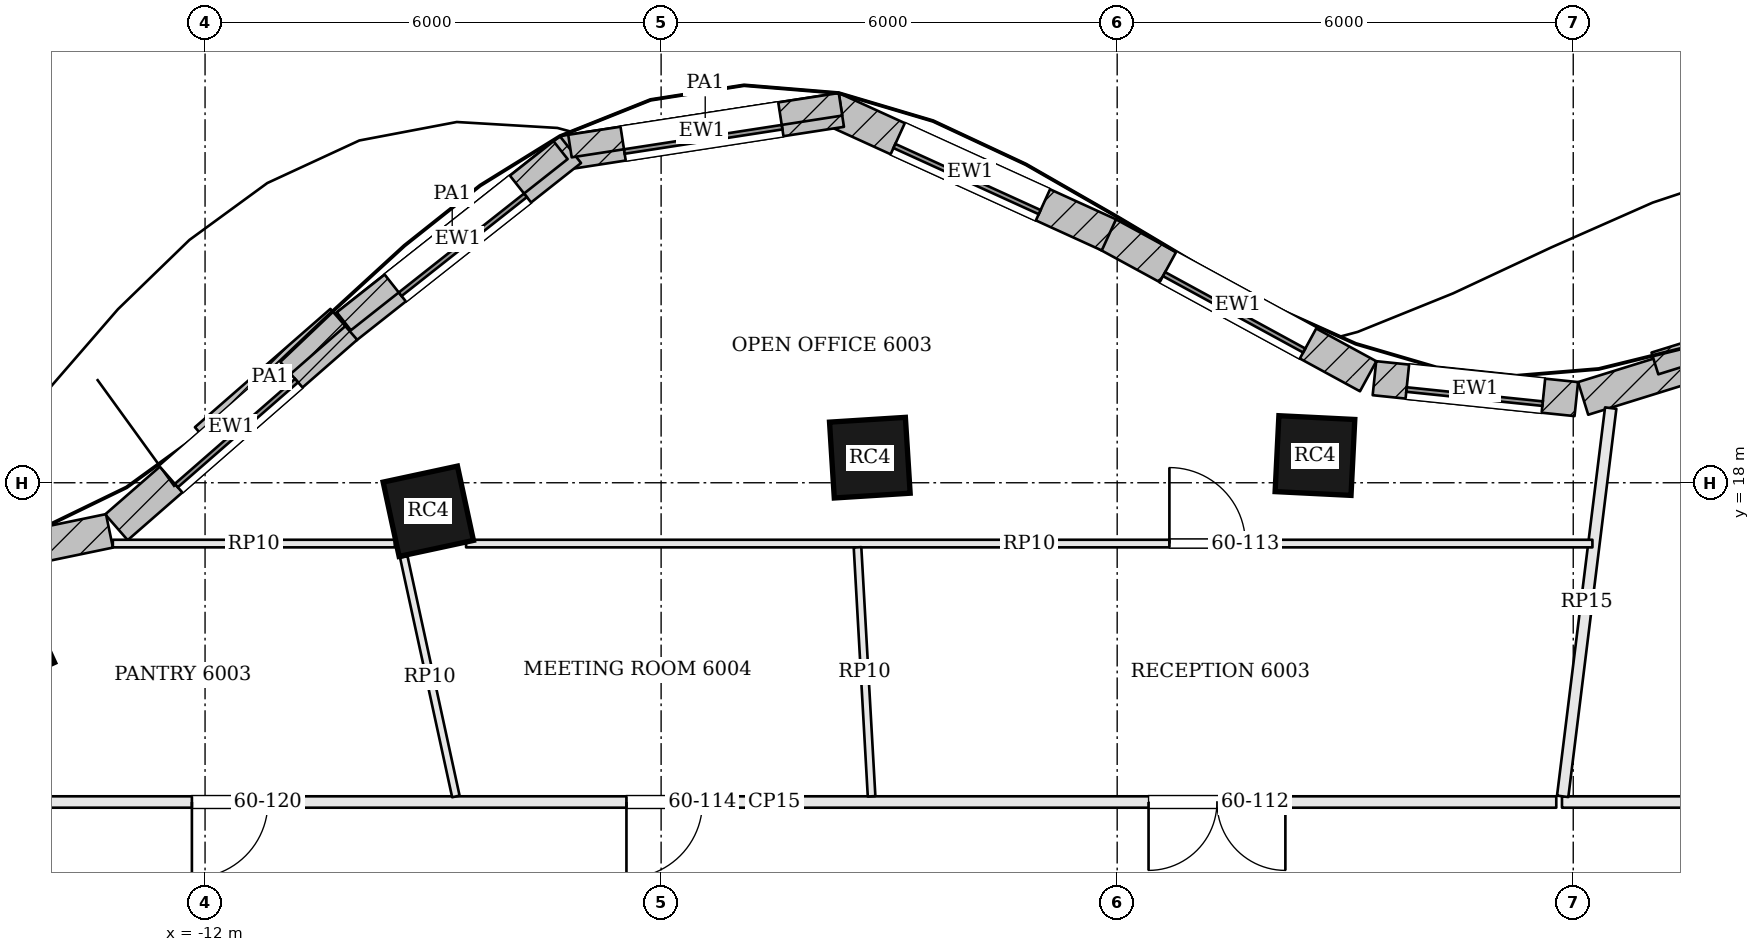
"""IFC4 building model, lengths in metres.
Left out: names, types, materials, properties, quantities, classifications, styles, units other than length and angle.
Written with IfcOpenShell. Run it as: python <this file> out.ifc"""

import sys

from ifc_helpers import new_model, si_unit, direction, frame, frame_2d, origin, origin_2d, place, context, subcontext, project, spatial, rectangle, extrude, element, fill, save


model = new_model("IFC4")
c1 = context("Model", 3, precision=1e-05, world=origin(), true_north=direction((0.0, 1.0)))
c2 = subcontext(c1, "Body", "Model", "MODEL_VIEW")
j1 = project(units=[si_unit("LENGTHUNIT", "METRE"), si_unit("PLANEANGLEUNIT", "RADIAN")], contexts=[c1])
p1 = place(None, origin())
s1 = spatial("IfcSite", under=j1, at=p1, CompositionType="ELEMENT")
p2 = place(p1, origin())
s2 = spatial("IfcBuilding", under=s1, at=p2, CompositionType="ELEMENT")
p3 = place(p2, frame((0.0, 0.0, 244.8)))
s3 = spatial("IfcBuildingStorey", under=s2, at=p3, CompositionType="ELEMENT", Elevation=244.8)
for number, where, z_axis, x_axis in (
    (1, (2.602, 18.358, 0.0), (0.0, 0.0, 1.0), (-0.999, 0.05, 0.0)),
    (2, (-3.254, 18.33, 0.0), (0.0, 0.0, 1.0), (-0.998, -0.063, 0.0)),
    (3, (-9.063, 17.625, 0.0), (0.0, 0.0, 1.0), (-0.978, -0.21, 0.0)),
    (4, (-14.643, 15.881, 0.0), (0.0, 0.0, 1.0), (-0.909, -0.417, 0.0)),
):
    element("IfcColumn", number, at=place(p3, frame(where, z_axis=z_axis, x_axis=x_axis)), inside=s3, PredefinedType="COLUMN", context=c2, shape_type="SweptSolid", body=[
        extrude(rectangle(XDim=1.0, YDim=1.0, at=origin_2d()), origin(), (0.0, 0.0, 1.0), 3.9),
    ])
p4 = place(p3, frame((11.007, 20.625, 0.0), z_axis=(0.0, 0.0, 1.0), x_axis=(-0.954949254112, -0.296769139352, 0.0)))
e5 = element("IfcWall", 5, at=p4, inside=s3, PredefinedType="SOLIDWALL", context=c2, shape_type="SweptSolid", body=[
    extrude(rectangle(XDim=5.106, YDim=0.45, at=frame_2d((2.553, 0.0))), origin(), (0.0, 0.0, 1.0), 3.7),
])
p5 = place(p4, frame((1.503, 0.0, 0.9)))
e6 = element("IfcOpeningElement", 6, at=p5, cuts=e5, PredefinedType="OPENING", context=c2, shape_type="SweptSolid", body=[
    extrude(rectangle(XDim=2.1, YDim=2.3, at=frame_2d((1.05, 1.15))), frame((0.0, 0.235, 0.0), z_axis=(0.0, -1.0, 0.0), x_axis=(1.0, 0.0, 0.0)), (0.0, 0.0, 1.0), 0.47),
])
p6 = place(p3, frame((6.04, 19.101, 0.0), z_axis=(0.0, 0.0, 1.0), x_axis=(-0.994675968472, 0.103052014752, 0.0)))
e7 = element("IfcWall", 7, at=p6, inside=s3, PredefinedType="SOLIDWALL", context=c2, shape_type="SweptSolid", body=[
    extrude(rectangle(XDim=2.67, YDim=0.45, at=frame_2d((1.335, 0.0))), origin(), (0.0, 0.0, 1.0), 3.7),
])
p7 = place(p6, frame((0.435, 0.0, 0.9)))
e8 = element("IfcOpeningElement", 8, at=p7, cuts=e7, PredefinedType="OPENING", context=c2, shape_type="SweptSolid", body=[
    extrude(rectangle(XDim=1.8, YDim=2.3, at=frame_2d((0.9, 1.15))), frame((0.0, 0.235, 0.0), z_axis=(0.0, -1.0, 0.0), x_axis=(1.0, 0.0, 0.0)), (0.0, 0.0, 1.0), 0.47),
])
p8 = place(p3, frame((3.302, 19.401, 0.0), z_axis=(0.0, 0.0, 1.0), x_axis=(-0.878060540763, 0.47854956562, 0.0)))
e9 = element("IfcWall", 9, at=p8, inside=s3, PredefinedType="SOLIDWALL", context=c2, shape_type="SweptSolid", body=[
    extrude(rectangle(XDim=3.901, YDim=0.45, at=frame_2d((1.951, 0.0))), origin(), (0.0, 0.0, 1.0), 3.7),
])
p9 = place(p8, frame((0.901, 0.0, 0.9)))
e10 = element("IfcOpeningElement", 10, at=p9, cuts=e9, PredefinedType="OPENING", context=c2, shape_type="SweptSolid", body=[
    extrude(rectangle(XDim=2.1, YDim=2.3, at=frame_2d((1.05, 1.15))), frame((0.0, 0.235, 0.0), z_axis=(0.0, -1.0, 0.0), x_axis=(1.0, 0.0, 0.0)), (0.0, 0.0, 1.0), 0.47),
])
p10 = place(p3, frame((-0.109, 21.261, 0.0), z_axis=(0.0, 0.0, 1.0), x_axis=(-0.910040573706, 0.414519184367, 0.0)))
e11 = element("IfcWall", 11, at=p10, inside=s3, PredefinedType="SOLIDWALL", context=c2, shape_type="SweptSolid", body=[
    extrude(rectangle(XDim=4.006, YDim=0.45, at=frame_2d((2.003, 0.0))), origin(), (0.0, 0.0, 1.0), 3.7),
])
p11 = place(p10, frame((0.953, 0.0, 0.9)))
e12 = element("IfcOpeningElement", 12, at=p11, cuts=e11, PredefinedType="OPENING", context=c2, shape_type="SweptSolid", body=[
    extrude(rectangle(XDim=2.1, YDim=2.3, at=frame_2d((1.05, 1.15))), frame((0.0, 0.235, 0.0), z_axis=(0.0, -1.0, 0.0), x_axis=(1.0, 0.0, 0.0)), (0.0, 0.0, 1.0), 0.47),
])
p12 = place(p3, frame((-3.629, 22.905, 0.0), z_axis=(0.0, 0.0, 1.0), x_axis=(-0.988300084321, -0.152521943772, 0.0)))
e13 = element("IfcWall", 13, at=p12, inside=s3, PredefinedType="SOLIDWALL", context=c2, shape_type="SweptSolid", body=[
    extrude(rectangle(XDim=3.71, YDim=0.45, at=frame_2d((1.855, 0.0))), origin(), (0.0, 0.0, 1.0), 3.7),
])
p13 = place(p12, frame((0.805, 0.0, 0.9)))
e14 = element("IfcOpeningElement", 14, at=p13, cuts=e13, PredefinedType="OPENING", context=c2, shape_type="SweptSolid", body=[
    extrude(rectangle(XDim=2.1, YDim=2.3, at=frame_2d((1.05, 1.15))), frame((0.0, 0.235, 0.0), z_axis=(0.0, -1.0, 0.0), x_axis=(1.0, 0.0, 0.0)), (0.0, 0.0, 1.0), 0.47),
])
p14 = place(p3, frame((-7.193, 22.383, 0.0), z_axis=(0.0, 0.0, 1.0), x_axis=(-0.784803291184, -0.619744942816, 0.0)))
e15 = element("IfcWall", 15, at=p14, inside=s3, PredefinedType="SOLIDWALL", context=c2, shape_type="SweptSolid", body=[
    extrude(rectangle(XDim=3.775, YDim=0.45, at=frame_2d((1.887, 0.0))), origin(), (0.0, 0.0, 1.0), 3.7),
])
p15 = place(p14, frame((0.837, 0.0, 0.9)))
e16 = element("IfcOpeningElement", 16, at=p15, cuts=e15, PredefinedType="OPENING", context=c2, shape_type="SweptSolid", body=[
    extrude(rectangle(XDim=2.1, YDim=2.3, at=frame_2d((1.05, 1.15))), frame((0.0, 0.235, 0.0), z_axis=(0.0, -1.0, 0.0), x_axis=(1.0, 0.0, 0.0)), (0.0, 0.0, 1.0), 0.47),
])
p16 = place(p3, frame((-10.146, 20.051, 0.0), z_axis=(0.0, 0.0, 1.0), x_axis=(-0.753278140428, -0.657702093013, 0.0)))
e17 = element("IfcWall", 17, at=p16, inside=s3, PredefinedType="SOLIDWALL", context=c2, shape_type="SweptSolid", body=[
    extrude(rectangle(XDim=4.008, YDim=0.45, at=frame_2d((2.004, 0.0))), origin(), (0.0, 0.0, 1.0), 3.7),
])
p17 = place(p16, frame((0.954, 0.0, 0.9)))
e18 = element("IfcOpeningElement", 18, at=p17, cuts=e17, PredefinedType="OPENING", context=c2, shape_type="SweptSolid", body=[
    extrude(rectangle(XDim=2.1, YDim=2.3, at=frame_2d((1.05, 1.15))), frame((0.0, 0.235, 0.0), z_axis=(0.0, -1.0, 0.0), x_axis=(1.0, 0.0, 0.0)), (0.0, 0.0, 1.0), 0.47),
])
p18 = place(p3, frame((-13.258, 17.367, 0.0), z_axis=(0.0, 0.0, 1.0), x_axis=(-0.97914968674, -0.203140077183, 0.0)))
e19 = element("IfcWall", 19, at=p18, inside=s3, PredefinedType="SOLIDWALL", context=c2, shape_type="SweptSolid", body=[
    extrude(rectangle(XDim=3.7, YDim=0.45, at=frame_2d((1.85, 0.0))), origin(), (0.0, 0.0, 1.0), 3.7),
])
p19 = place(p18, frame((0.95, 0.0, 0.9)))
e20 = element("IfcOpeningElement", 20, at=p19, cuts=e19, PredefinedType="OPENING", context=c2, shape_type="SweptSolid", body=[
    extrude(rectangle(XDim=1.8, YDim=2.3, at=frame_2d((0.9, 1.15))), frame((0.0, 0.235, 0.0), z_axis=(0.0, -1.0, 0.0), x_axis=(1.0, 0.0, 0.0)), (0.0, 0.0, 1.0), 0.47),
])
p20 = place(p3, frame((10.59, 20.662, 3.9), z_axis=(0.0, 0.0, 1.0), x_axis=(-0.954933257017, -0.296820610207, 0.0)))
e21 = element("IfcWall", 21, at=p20, inside=s3, PredefinedType="PARAPET", context=c2, shape_type="SweptSolid", body=[
    extrude(rectangle(XDim=3.681, YDim=0.3, at=frame_2d((1.84, 0.0))), origin(), (0.0, 0.0, 1.0), 1.1),
])
p21 = place(p3, frame((-3.64, 22.979, 3.9), z_axis=(0.0, 0.0, 1.0), x_axis=(-0.988299486994, -0.152525814235, 0.0)))
e22 = element("IfcWall", 22, at=p21, inside=s3, PredefinedType="PARAPET", context=c2, shape_type="SweptSolid", body=[
    extrude(rectangle(XDim=3.602, YDim=0.3, at=frame_2d((1.801, 0.0))), origin(), (0.0, 0.0, 1.0), 1.1),
])
p22 = place(p3, frame((-7.323, 22.376, 3.9), z_axis=(0.0, 0.0, 1.0), x_axis=(-0.784819122577, -0.61972489448, 0.0)))
e23 = element("IfcWall", 23, at=p22, inside=s3, PredefinedType="PARAPET", context=c2, shape_type="SweptSolid", body=[
    extrude(rectangle(XDim=3.633, YDim=0.3, at=frame_2d((1.817, 0.0))), origin(), (0.0, 0.0, 1.0), 1.1),
])
p23 = place(p3, frame((-10.252, 20.174, 3.9), z_axis=(0.0, 0.0, 1.0), x_axis=(-0.753260147018, -0.657722700622, 0.0)))
e24 = element("IfcWall", 24, at=p23, inside=s3, PredefinedType="PARAPET", context=c2, shape_type="SweptSolid", body=[
    extrude(rectangle(XDim=2.366, YDim=0.3, at=frame_2d((1.183, 0.0))), origin(), (0.0, 0.0, 1.0), 1.1),
])
p24 = place(p3, frame((14.725, 13.8, 0.0), z_axis=(0.0, 0.0, 1.0), x_axis=(-1.0, 0.0, 0.0)))
e25 = element("IfcWall", 25, at=p24, inside=s3, PredefinedType="PARTITIONING", context=c2, shape_type="SweptSolid", body=[
    extrude(rectangle(XDim=8.873, YDim=0.15, at=frame_2d((4.437, 0.0))), origin(), (0.0, 0.0, 1.0), 3.084),
])
p25 = place(p3, frame((6.493, 18.982, 0.0), z_axis=(0.0, 0.0, 1.0), x_axis=(-0.122808633413, -0.992430370131, 0.0)))
e26 = element("IfcWall", 26, at=p25, inside=s3, PredefinedType="PARTITIONING", context=c2, shape_type="SweptSolid", body=[
    extrude(rectangle(XDim=5.147, YDim=0.15, at=frame_2d((2.573, 0.0))), origin(), (0.0, 0.0, 1.0), 3.084),
])
p26 = place(p3, frame((5.777, 13.8, 0.0), z_axis=(0.0, 0.0, 1.0), x_axis=(-1.0, 0.0, 0.0)))
e27 = element("IfcWall", 27, at=p26, inside=s3, PredefinedType="PARTITIONING", context=c2, shape_type="SweptSolid", body=[
    extrude(rectangle(XDim=20.577, YDim=0.15, at=frame_2d((10.289, 0.0))), origin(), (0.0, 0.0, 1.0), 3.084),
])
p27 = place(p26, frame((3.564, 0.0, 0.0)))
e28 = element("IfcOpeningElement", 28, at=p27, cuts=e27, PredefinedType="OPENING", context=c2, shape_type="SweptSolid", body=[
    extrude(rectangle(XDim=1.8, YDim=2.1, at=frame_2d((0.9, 1.05))), frame((0.0, 0.085, 0.0), z_axis=(0.0, -1.0, 0.0), x_axis=(1.0, 0.0, 0.0)), (0.0, 0.0, 1.0), 0.17),
])
p28 = place(p26, frame((11.233, 0.0, 0.0)))
e29 = element("IfcOpeningElement", 29, at=p28, cuts=e27, PredefinedType="OPENING", context=c2, shape_type="SweptSolid", body=[
    extrude(rectangle(XDim=1.0, YDim=2.4, at=frame_2d((0.5, 1.2))), frame((0.0, 0.085, 0.0), z_axis=(0.0, -1.0, 0.0), x_axis=(1.0, 0.0, 0.0)), (0.0, 0.0, 1.0), 0.17),
])
p29 = place(p26, frame((16.95, 0.0, 0.0)))
e30 = element("IfcOpeningElement", 30, at=p29, cuts=e27, PredefinedType="OPENING", context=c2, shape_type="SweptSolid", body=[
    extrude(rectangle(XDim=1.0, YDim=2.1, at=frame_2d((0.5, 1.05))), frame((0.0, 0.085, 0.0), z_axis=(0.0, -1.0, 0.0), x_axis=(1.0, 0.0, 0.0)), (0.0, 0.0, 1.0), 0.17),
])
p30 = place(p3, frame((-13.213, 17.2, 0.0), z_axis=(0.0, 0.0, 1.0), x_axis=(1.0, 0.0, 0.0)))
e31 = element("IfcWall", 31, at=p30, inside=s3, PredefinedType="PARTITIONING", context=c2, shape_type="SweptSolid", body=[
    extrude(rectangle(XDim=3.71, YDim=0.1, at=frame_2d((1.855, 0.0))), origin(), (0.0, 0.0, 1.0), 3.084),
])
p31 = place(p3, frame((-8.566, 17.2, 0.0), z_axis=(0.0, 0.0, 1.0), x_axis=(1.0, 0.0, 0.0)))
e32 = element("IfcWall", 32, at=p31, inside=s3, PredefinedType="PARTITIONING", context=c2, shape_type="SweptSolid", body=[
    extrude(rectangle(XDim=14.818, YDim=0.1, at=frame_2d((7.409, 0.0))), origin(), (0.0, 0.0, 1.0), 3.084),
])
p32 = place(p31, frame((9.253, 0.0, 0.0)))
e33 = element("IfcOpeningElement", 33, at=p32, cuts=e32, PredefinedType="OPENING", context=c2, shape_type="SweptSolid", body=[
    extrude(rectangle(XDim=1.0, YDim=2.1, at=frame_2d((0.5, 1.05))), frame((0.0, 0.06, 0.0), z_axis=(0.0, -1.0, 0.0), x_axis=(1.0, 0.0, 0.0)), (0.0, 0.0, 1.0), 0.12),
])
p33 = place(p3, frame((-3.231, 13.875, 0.0), z_axis=(0.0, 0.0, 1.0), x_axis=(-0.056339740822, 0.998411655383, 0.0)))
e34 = element("IfcWall", 34, at=p33, inside=s3, PredefinedType="PARTITIONING", context=c2, shape_type="SweptSolid", body=[
    extrude(rectangle(XDim=3.28, YDim=0.1, at=frame_2d((1.64, 0.0))), origin(), (0.0, 0.0, 1.0), 3.084),
])
p34 = place(p3, frame((-8.7, 13.873, 0.0), z_axis=(0.0, 0.0, 1.0), x_axis=(-0.212558538076, 0.977148334641, 0.0)))
e35 = element("IfcWall", 35, at=p34, inside=s3, PredefinedType="PARTITIONING", context=c2, shape_type="SweptSolid", body=[
    extrude(rectangle(XDim=3.224, YDim=0.1, at=frame_2d((1.612, 0.0))), origin(), (0.0, 0.0, 1.0), 3.084),
])
p35 = place(p7, origin())
e36 = element("IfcWindow", 36, at=p35, inside=s3, PartitioningType="SINGLE_PANEL", PredefinedType="WINDOW", context=c2, shape_type="SweptSolid", body=[
    extrude(rectangle(XDim=1.8, YDim=2.3, at=frame_2d((0.9, 1.15))), frame((0.0, 0.135, 0.0), z_axis=(0.0, -1.0, 0.0), x_axis=(1.0, 0.0, 0.0)), (0.0, 0.0, 1.0), 0.06),
])
fill(e8, e36)
p36 = place(p9, origin())
e37 = element("IfcWindow", 37, at=p36, inside=s3, PartitioningType="SINGLE_PANEL", PredefinedType="WINDOW", context=c2, shape_type="SweptSolid", body=[
    extrude(rectangle(XDim=2.1, YDim=2.3, at=frame_2d((1.05, 1.15))), frame((0.0, 0.135, 0.0), z_axis=(0.0, -1.0, 0.0), x_axis=(1.0, 0.0, 0.0)), (0.0, 0.0, 1.0), 0.06),
])
fill(e10, e37)
p37 = place(p11, origin())
e38 = element("IfcWindow", 38, at=p37, inside=s3, PartitioningType="SINGLE_PANEL", PredefinedType="WINDOW", context=c2, shape_type="SweptSolid", body=[
    extrude(rectangle(XDim=2.1, YDim=2.3, at=frame_2d((1.05, 1.15))), frame((0.0, 0.135, 0.0), z_axis=(0.0, -1.0, 0.0), x_axis=(1.0, 0.0, 0.0)), (0.0, 0.0, 1.0), 0.06),
])
fill(e12, e38)
p38 = place(p13, origin())
e39 = element("IfcWindow", 39, at=p38, inside=s3, PartitioningType="SINGLE_PANEL", PredefinedType="WINDOW", context=c2, shape_type="SweptSolid", body=[
    extrude(rectangle(XDim=2.1, YDim=2.3, at=frame_2d((1.05, 1.15))), frame((0.0, 0.135, 0.0), z_axis=(0.0, -1.0, 0.0), x_axis=(1.0, 0.0, 0.0)), (0.0, 0.0, 1.0), 0.06),
])
fill(e14, e39)
p39 = place(p15, origin())
e40 = element("IfcWindow", 40, at=p39, inside=s3, PartitioningType="SINGLE_PANEL", PredefinedType="WINDOW", context=c2, shape_type="SweptSolid", body=[
    extrude(rectangle(XDim=2.1, YDim=2.3, at=frame_2d((1.05, 1.15))), frame((0.0, 0.135, 0.0), z_axis=(0.0, -1.0, 0.0), x_axis=(1.0, 0.0, 0.0)), (0.0, 0.0, 1.0), 0.06),
])
fill(e16, e40)
p40 = place(p17, origin())
e41 = element("IfcWindow", 41, at=p40, inside=s3, PartitioningType="SINGLE_PANEL", PredefinedType="WINDOW", context=c2, shape_type="SweptSolid", body=[
    extrude(rectangle(XDim=2.1, YDim=2.3, at=frame_2d((1.05, 1.15))), frame((0.0, 0.135, 0.0), z_axis=(0.0, -1.0, 0.0), x_axis=(1.0, 0.0, 0.0)), (0.0, 0.0, 1.0), 0.06),
])
fill(e18, e41)
p41 = place(p27, origin())
e42 = element("IfcDoor", 42, at=p41, inside=s3, OperationType="DOUBLE_DOOR_SINGLE_SWING", PredefinedType="DOOR", context=c2, shape_type="SweptSolid", body=[
    extrude(rectangle(XDim=1.8, YDim=2.1, at=frame_2d((0.9, 1.05))), frame((0.0, 0.025, 0.0), z_axis=(0.0, -1.0, 0.0), x_axis=(1.0, 0.0, 0.0)), (0.0, 0.0, 1.0), 0.05),
])
fill(e28, e42)
p42 = place(p32, origin())
e43 = element("IfcDoor", 43, at=p42, inside=s3, OperationType="SINGLE_SWING_LEFT", PredefinedType="DOOR", context=c2, shape_type="SweptSolid", body=[
    extrude(rectangle(XDim=1.0, YDim=2.1, at=frame_2d((0.5, 1.05))), frame((0.0, 0.025, 0.0), z_axis=(0.0, -1.0, 0.0), x_axis=(1.0, 0.0, 0.0)), (0.0, 0.0, 1.0), 0.05),
])
fill(e33, e43)
p43 = place(p28, origin())
e44 = element("IfcDoor", 44, at=p43, inside=s3, OperationType="SINGLE_SWING_RIGHT", PredefinedType="DOOR", context=c2, shape_type="SweptSolid", body=[
    extrude(rectangle(XDim=1.0, YDim=2.4, at=frame_2d((0.5, 1.2))), frame((0.0, 0.025, 0.0), z_axis=(0.0, -1.0, 0.0), x_axis=(1.0, 0.0, 0.0)), (0.0, 0.0, 1.0), 0.05),
])
fill(e29, e44)
p44 = place(p29, origin())
e45 = element("IfcDoor", 45, at=p44, inside=s3, OperationType="SINGLE_SWING_RIGHT", PredefinedType="DOOR", context=c2, shape_type="SweptSolid", body=[
    extrude(rectangle(XDim=1.0, YDim=2.1, at=frame_2d((0.5, 1.05))), frame((0.0, 0.025, 0.0), z_axis=(0.0, -1.0, 0.0), x_axis=(1.0, 0.0, 0.0)), (0.0, 0.0, 1.0), 0.05),
])
fill(e30, e45)
save(model, sys.argv[1])
